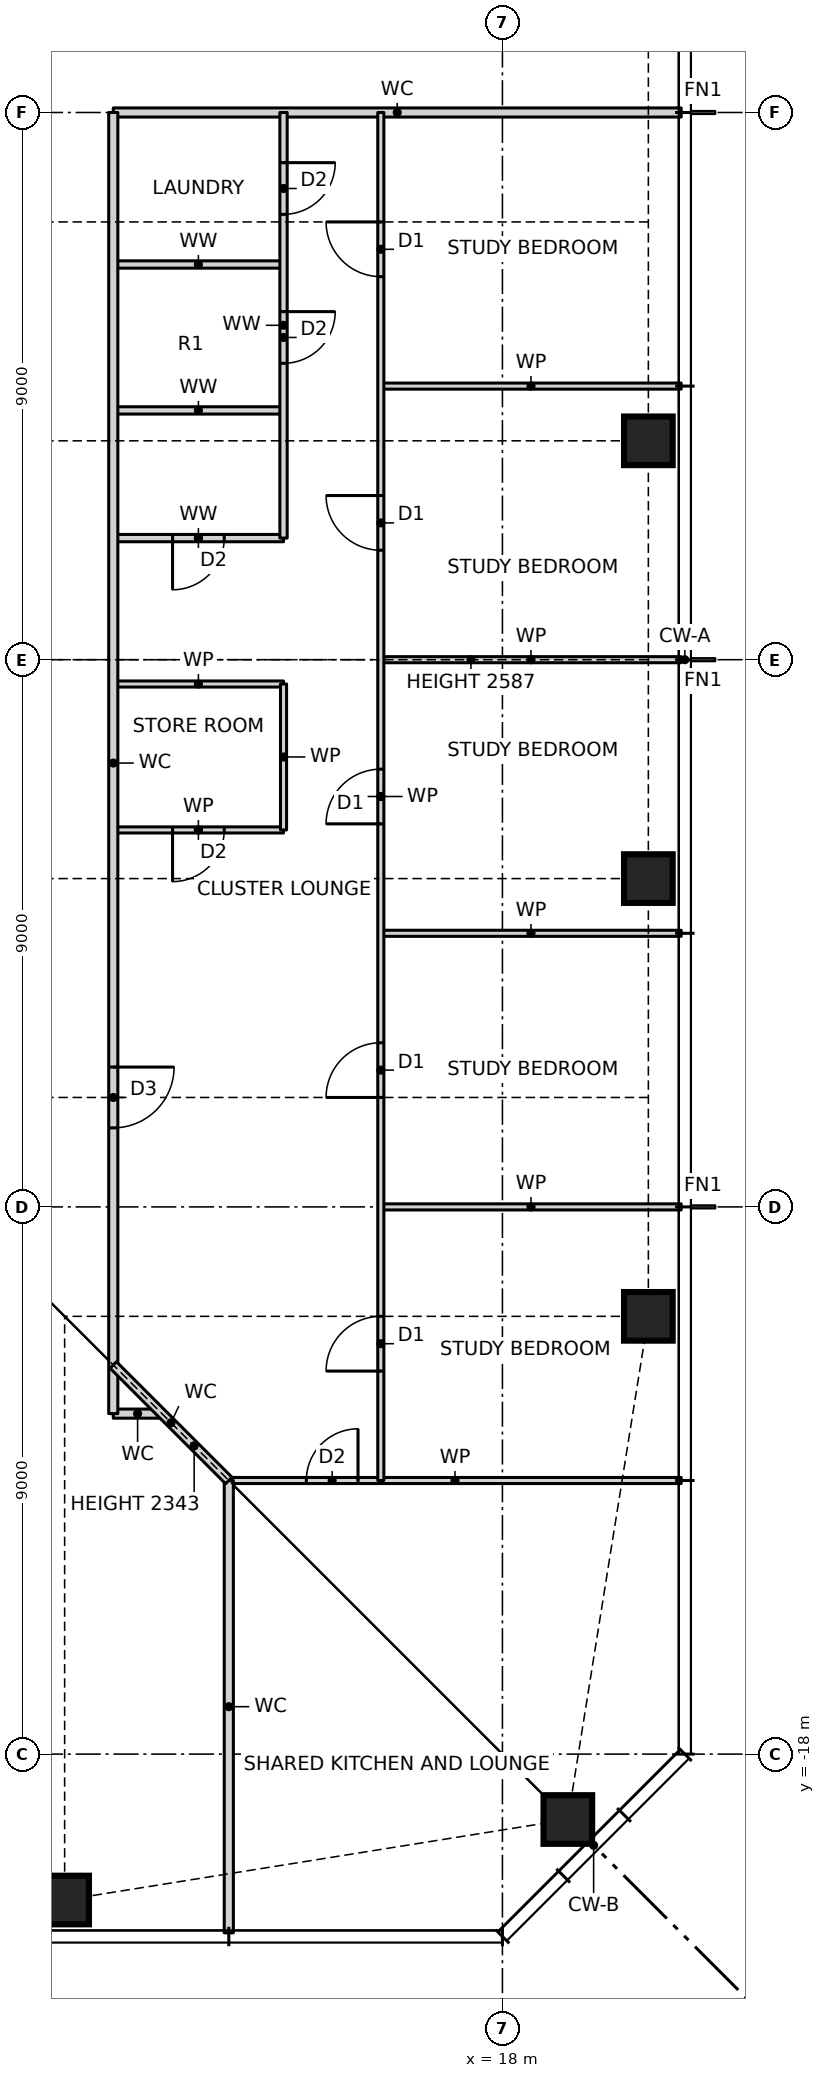
"""IFC4 building model, lengths in metres.
Left out: names, types, materials, properties, quantities, classifications, styles, units other than length and angle.
Written with IfcOpenShell. Run it as: python <this file> out.ifc"""

import sys

from ifc_helpers import new_model, si_unit, direction, frame, frame_2d, origin, origin_2d, place, context, subcontext, project, spatial, rectangle, hollow_rectangle, extrude, element, fill, save


model = new_model("IFC4")
c1 = context("Model", 3, precision=1e-05, world=origin(), true_north=direction((0.0, 1.0)))
c2 = subcontext(c1, "Body", "Model", "MODEL_VIEW")
j1 = project(units=[si_unit("LENGTHUNIT", "METRE"), si_unit("PLANEANGLEUNIT", "RADIAN")], contexts=[c1])
p1 = place(None, origin())
s1 = spatial("IfcSite", under=j1, at=p1, CompositionType="ELEMENT")
p2 = place(p1, origin())
s2 = spatial("IfcBuilding", under=s1, at=p2, CompositionType="ELEMENT")
p3 = place(p2, frame((0.0, 0.0, 87.5)))
s3 = spatial("IfcBuildingStorey", under=s2, at=p3, CompositionType="ELEMENT", Elevation=87.5)
for number, where, z_axis, x_axis in (
    (1, (10.8, -20.4, 0.0), (0.0, 0.0, 1.0), (1.0, 0.0, 0.0)),
    (2, (19.076, -19.076, 0.0), (0.0, 0.0, 1.0), (1.0, 0.0, 0.0)),
    (3, (20.4, -10.8, 0.0), (0.0, 0.0, 1.0), (1.0, 0.0, 0.0)),
    (4, (20.4, -3.6, 0.0), (0.0, 0.0, 1.0), (1.0, 0.0, 0.0)),
    (5, (20.4, 3.6, 0.0), (0.0, 0.0, 1.0), (1.0, 0.0, 0.0)),
):
    element("IfcColumn", number, at=place(p3, frame(where, z_axis=z_axis, x_axis=x_axis)), inside=s3, PredefinedType="COLUMN", context=c2, shape_type="SweptSolid", body=[
        extrude(hollow_rectangle(XDim=0.8, YDim=0.8, WallThickness=0.07, at=origin_2d()), origin(), (0.0, 0.0, 1.0), 3.5),
    ])
p4 = place(p3, frame((13.5, -13.5, 0.0), z_axis=(0.0, 0.0, 1.0), x_axis=(1.0, 0.0, 0.0)))
e6 = element("IfcWall", 6, at=p4, inside=s3, PredefinedType="PARTITIONING", context=c2, shape_type="SweptSolid", body=[
    extrude(rectangle(XDim=7.44, YDim=0.1, at=frame_2d((3.72, 0.0))), origin(), (0.0, 0.0, 1.0), 3.27),
])
p5 = place(p4, frame((1.275, 0.0, 0.0)))
e7 = element("IfcOpeningElement", 7, at=p5, cuts=e6, PredefinedType="OPENING", context=c2, shape_type="SweptSolid", body=[
    extrude(rectangle(XDim=0.85, YDim=2.1, at=frame_2d((0.425, 1.05))), frame((0.0, 0.06, 0.0), z_axis=(0.0, -1.0, 0.0), x_axis=(1.0, 0.0, 0.0)), (0.0, 0.0, 1.0), 0.12),
])
p6 = place(p3, frame((11.6, -12.4, 0.0), z_axis=(0.0, 0.0, 1.0), x_axis=(1.0, 0.0, 0.0)))
e8 = element("IfcWall", 8, at=p6, inside=s3, PredefinedType="PARTITIONING", context=c2, shape_type="SweptSolid", body=[
    extrude(rectangle(XDim=0.8, YDim=0.15, at=frame_2d((0.4, 0.0))), origin(), (0.0, 0.0, 1.0), 3.27),
])
for number, where, z_axis, x_axis in (
    (9, (16.0, -9.0, 0.0), (0.0, 0.0, 1.0), (1.0, 0.0, 0.0)),
    (10, (16.0, -4.5, 0.0), (0.0, 0.0, 1.0), (1.0, 0.0, 0.0)),
):
    element("IfcWall", number, at=place(p3, frame(where, z_axis=z_axis, x_axis=x_axis)), inside=s3, PredefinedType="PARTITIONING", context=c2, shape_type="SweptSolid", body=[
        extrude(rectangle(XDim=4.94, YDim=0.1, at=frame_2d((2.47, 0.0))), origin(), (0.0, 0.0, 1.0), 3.27),
    ])
p7 = place(p3, frame((11.6, -2.8, 0.0), z_axis=(0.0, 0.0, 1.0), x_axis=(1.0, 0.0, 0.0)))
e11 = element("IfcWall", 11, at=p7, inside=s3, PredefinedType="PARTITIONING", context=c2, shape_type="SweptSolid", body=[
    extrude(rectangle(XDim=2.8, YDim=0.1, at=frame_2d((1.4, 0.0))), origin(), (0.0, 0.0, 1.0), 3.27),
])
p8 = place(p7, frame((0.975, 0.0, 0.0)))
e12 = element("IfcOpeningElement", 12, at=p8, cuts=e11, PredefinedType="OPENING", context=c2, shape_type="SweptSolid", body=[
    extrude(rectangle(XDim=0.85, YDim=2.1, at=frame_2d((0.425, 1.05))), frame((0.0, 0.06, 0.0), z_axis=(0.0, -1.0, 0.0), x_axis=(1.0, 0.0, 0.0)), (0.0, 0.0, 1.0), 0.12),
])
p9 = place(p3, frame((11.6, -0.4, 0.0), z_axis=(0.0, 0.0, 1.0), x_axis=(1.0, 0.0, 0.0)))
e13 = element("IfcWall", 13, at=p9, inside=s3, PredefinedType="PARTITIONING", context=c2, shape_type="SweptSolid", body=[
    extrude(rectangle(XDim=2.8, YDim=0.1, at=frame_2d((1.4, 0.0))), origin(), (0.0, 0.0, 1.0), 3.27),
])
p10 = place(p3, frame((16.0, 0.0, 0.0), z_axis=(0.0, 0.0, 1.0), x_axis=(1.0, 0.0, 0.0)))
e14 = element("IfcWall", 14, at=p10, inside=s3, PredefinedType="PARTITIONING", context=c2, shape_type="SweptSolid", body=[
    extrude(rectangle(XDim=4.94, YDim=0.1, at=frame_2d((2.47, 0.0))), origin(), (0.0, 0.0, 1.0), 2.587),
])
p11 = place(p3, frame((11.6, 2.0, 0.0), z_axis=(0.0, 0.0, 1.0), x_axis=(1.0, 0.0, 0.0)))
e15 = element("IfcWall", 15, at=p11, inside=s3, PredefinedType="PARTITIONING", context=c2, shape_type="SweptSolid", body=[
    extrude(rectangle(XDim=2.8, YDim=0.12, at=frame_2d((1.4, 0.0))), origin(), (0.0, 0.0, 1.0), 3.27),
])
p12 = place(p11, frame((0.975, 0.0, 0.0)))
e16 = element("IfcOpeningElement", 16, at=p12, cuts=e15, PredefinedType="OPENING", context=c2, shape_type="SweptSolid", body=[
    extrude(rectangle(XDim=0.85, YDim=2.1, at=frame_2d((0.425, 1.05))), frame((0.0, 0.07, 0.0), z_axis=(0.0, -1.0, 0.0), x_axis=(1.0, 0.0, 0.0)), (0.0, 0.0, 1.0), 0.14),
])
p13 = place(p3, frame((11.6, 4.1, 0.0), z_axis=(0.0, 0.0, 1.0), x_axis=(1.0, 0.0, 0.0)))
e17 = element("IfcWall", 17, at=p13, inside=s3, PredefinedType="PARTITIONING", context=c2, shape_type="SweptSolid", body=[
    extrude(rectangle(XDim=2.8, YDim=0.12, at=frame_2d((1.4, 0.0))), origin(), (0.0, 0.0, 1.0), 3.27),
])
p14 = place(p3, frame((16.0, 4.5, 0.0), z_axis=(0.0, 0.0, 1.0), x_axis=(1.0, 0.0, 0.0)))
e18 = element("IfcWall", 18, at=p14, inside=s3, PredefinedType="PARTITIONING", context=c2, shape_type="SweptSolid", body=[
    extrude(rectangle(XDim=4.94, YDim=0.1, at=frame_2d((2.47, 0.0))), origin(), (0.0, 0.0, 1.0), 3.27),
])
p15 = place(p3, frame((11.6, 6.5, 0.0), z_axis=(0.0, 0.0, 1.0), x_axis=(1.0, 0.0, 0.0)))
e19 = element("IfcWall", 19, at=p15, inside=s3, PredefinedType="PARTITIONING", context=c2, shape_type="SweptSolid", body=[
    extrude(rectangle(XDim=2.8, YDim=0.12, at=frame_2d((1.4, 0.0))), origin(), (0.0, 0.0, 1.0), 3.27),
])
p16 = place(p3, frame((11.6, 9.0, 0.0), z_axis=(0.0, 0.0, 1.0), x_axis=(1.0, 0.0, 0.0)))
e20 = element("IfcWall", 20, at=p16, inside=s3, PredefinedType="PARTITIONING", context=c2, shape_type="SweptSolid", body=[
    extrude(rectangle(XDim=9.34, YDim=0.15, at=frame_2d((4.67, 0.0))), origin(), (0.0, 0.0, 1.0), 3.27),
])
p17 = place(p3, frame((16.0, -13.5, 0.0), z_axis=(0.0, 0.0, 1.0), x_axis=(0.0, 1.0, 0.0)))
e21 = element("IfcWall", 21, at=p17, inside=s3, PredefinedType="PARTITIONING", context=c2, shape_type="SweptSolid", body=[
    extrude(rectangle(XDim=22.5, YDim=0.1, at=frame_2d((11.25, 0.0))), origin(), (0.0, 0.0, 1.0), 3.27),
])
p18 = place(p17, frame((1.8, 0.0, 0.0)))
e22 = element("IfcOpeningElement", 22, at=p18, cuts=e21, PredefinedType="OPENING", context=c2, shape_type="SweptSolid", body=[
    extrude(rectangle(XDim=0.9, YDim=2.1, at=frame_2d((0.45, 1.05))), frame((0.0, 0.06, 0.0), z_axis=(0.0, -1.0, 0.0), x_axis=(1.0, 0.0, 0.0)), (0.0, 0.0, 1.0), 0.12),
])
p19 = place(p17, frame((6.3, 0.0, 0.0)))
e23 = element("IfcOpeningElement", 23, at=p19, cuts=e21, PredefinedType="OPENING", context=c2, shape_type="SweptSolid", body=[
    extrude(rectangle(XDim=0.9, YDim=2.1, at=frame_2d((0.45, 1.05))), frame((0.0, 0.06, 0.0), z_axis=(0.0, -1.0, 0.0), x_axis=(1.0, 0.0, 0.0)), (0.0, 0.0, 1.0), 0.12),
])
p20 = place(p17, frame((10.8, 0.0, 0.0)))
e24 = element("IfcOpeningElement", 24, at=p20, cuts=e21, PredefinedType="OPENING", context=c2, shape_type="SweptSolid", body=[
    extrude(rectangle(XDim=0.9, YDim=2.1, at=frame_2d((0.45, 1.05))), frame((0.0, 0.06, 0.0), z_axis=(0.0, -1.0, 0.0), x_axis=(1.0, 0.0, 0.0)), (0.0, 0.0, 1.0), 0.12),
])
p21 = place(p17, frame((15.3, 0.0, 0.0)))
e25 = element("IfcOpeningElement", 25, at=p21, cuts=e21, PredefinedType="OPENING", context=c2, shape_type="SweptSolid", body=[
    extrude(rectangle(XDim=0.9, YDim=2.1, at=frame_2d((0.45, 1.05))), frame((0.0, 0.06, 0.0), z_axis=(0.0, -1.0, 0.0), x_axis=(1.0, 0.0, 0.0)), (0.0, 0.0, 1.0), 0.12),
])
p22 = place(p17, frame((19.8, 0.0, 0.0)))
e26 = element("IfcOpeningElement", 26, at=p22, cuts=e21, PredefinedType="OPENING", context=c2, shape_type="SweptSolid", body=[
    extrude(rectangle(XDim=0.9, YDim=2.1, at=frame_2d((0.45, 1.05))), frame((0.0, 0.06, 0.0), z_axis=(0.0, -1.0, 0.0), x_axis=(1.0, 0.0, 0.0)), (0.0, 0.0, 1.0), 0.12),
])
p23 = place(p3, frame((14.4, -2.8, 0.0), z_axis=(0.0, 0.0, 1.0), x_axis=(0.0, 1.0, 0.0)))
e27 = element("IfcWall", 27, at=p23, inside=s3, PredefinedType="PARTITIONING", context=c2, shape_type="SweptSolid", body=[
    extrude(rectangle(XDim=2.4, YDim=0.1, at=frame_2d((1.2, 0.0))), origin(), (0.0, 0.0, 1.0), 3.27),
])
p24 = place(p3, frame((14.4, 2.0, 0.0), z_axis=(0.0, 0.0, 1.0), x_axis=(0.0, 1.0, 0.0)))
e28 = element("IfcWall", 28, at=p24, inside=s3, PredefinedType="PARTITIONING", context=c2, shape_type="SweptSolid", body=[
    extrude(rectangle(XDim=7.0, YDim=0.12, at=frame_2d((3.5, 0.0))), origin(), (0.0, 0.0, 1.0), 3.27),
])
p25 = place(p24, frame((2.875, 0.0, 0.0)))
e29 = element("IfcOpeningElement", 29, at=p25, cuts=e28, PredefinedType="OPENING", context=c2, shape_type="SweptSolid", body=[
    extrude(rectangle(XDim=0.85, YDim=2.1, at=frame_2d((0.425, 1.05))), frame((0.0, 0.07, 0.0), z_axis=(0.0, -1.0, 0.0), x_axis=(1.0, 0.0, 0.0)), (0.0, 0.0, 1.0), 0.14),
])
p26 = place(p24, frame((5.325, 0.0, 0.0)))
e30 = element("IfcOpeningElement", 30, at=p26, cuts=e28, PredefinedType="OPENING", context=c2, shape_type="SweptSolid", body=[
    extrude(rectangle(XDim=0.85, YDim=2.1, at=frame_2d((0.425, 1.05))), frame((0.0, 0.07, 0.0), z_axis=(0.0, -1.0, 0.0), x_axis=(1.0, 0.0, 0.0)), (0.0, 0.0, 1.0), 0.14),
])
p27 = place(p3, frame((13.5, -20.94, 0.0), z_axis=(0.0, 0.0, 1.0), x_axis=(0.0, 1.0, 0.0)))
e31 = element("IfcWall", 31, at=p27, inside=s3, PredefinedType="PARTITIONING", context=c2, shape_type="SweptSolid", body=[
    extrude(rectangle(XDim=7.44, YDim=0.15, at=frame_2d((3.72, 0.0))), origin(), (0.0, 0.0, 1.0), 3.27),
])
p28 = place(p3, frame((11.6, -12.4, 0.0), z_axis=(0.0, 0.0, 1.0), x_axis=(0.0, 1.0, 0.0)))
e32 = element("IfcWall", 32, at=p28, inside=s3, PredefinedType="PARTITIONING", context=c2, shape_type="SweptSolid", body=[
    extrude(rectangle(XDim=21.4, YDim=0.15, at=frame_2d((10.7, 0.0))), origin(), (0.0, 0.0, 1.0), 3.27),
])
p29 = place(p28, frame((4.7, 0.0, 0.0)))
e33 = element("IfcOpeningElement", 33, at=p29, cuts=e32, PredefinedType="OPENING", context=c2, shape_type="SweptSolid", body=[
    extrude(rectangle(XDim=1.0, YDim=2.1, at=frame_2d((0.5, 1.05))), frame((0.0, 0.085, 0.0), z_axis=(0.0, -1.0, 0.0), x_axis=(1.0, 0.0, 0.0)), (0.0, 0.0, 1.0), 0.17),
])
p30 = place(p3, frame((13.5, -13.5, 0.0), z_axis=(0.0, 0.0, 1.0), x_axis=(-0.707106781187, 0.707106781187, 0.0)))
e34 = element("IfcWall", 34, at=p30, inside=s3, PredefinedType="PARTITIONING", context=c2, shape_type="SweptSolid", body=[
    extrude(rectangle(XDim=2.687, YDim=0.15, at=frame_2d((1.343, 0.0))), origin(), (0.0, 0.0, 1.0), 2.343),
])
p31 = place(p18, origin())
e35 = element("IfcDoor", 35, at=p31, inside=s3, OperationType="SINGLE_SWING_LEFT", PredefinedType="DOOR", context=c2, shape_type="SweptSolid", body=[
    extrude(rectangle(XDim=0.9, YDim=2.1, at=frame_2d((0.45, 1.05))), frame((0.0, 0.025, 0.0), z_axis=(0.0, -1.0, 0.0), x_axis=(1.0, 0.0, 0.0)), (0.0, 0.0, 1.0), 0.05),
])
fill(e22, e35)
p32 = place(p19, origin())
e36 = element("IfcDoor", 36, at=p32, inside=s3, OperationType="SINGLE_SWING_LEFT", PredefinedType="DOOR", context=c2, shape_type="SweptSolid", body=[
    extrude(rectangle(XDim=0.9, YDim=2.1, at=frame_2d((0.45, 1.05))), frame((0.0, 0.025, 0.0), z_axis=(0.0, -1.0, 0.0), x_axis=(1.0, 0.0, 0.0)), (0.0, 0.0, 1.0), 0.05),
])
fill(e23, e36)
p33 = place(p20, origin())
e37 = element("IfcDoor", 37, at=p33, inside=s3, OperationType="SINGLE_SWING_LEFT", PredefinedType="DOOR", context=c2, shape_type="SweptSolid", body=[
    extrude(rectangle(XDim=0.9, YDim=2.1, at=frame_2d((0.45, 1.05))), frame((0.0, 0.025, 0.0), z_axis=(0.0, -1.0, 0.0), x_axis=(1.0, 0.0, 0.0)), (0.0, 0.0, 1.0), 0.05),
])
fill(e24, e37)
p34 = place(p21, origin())
e38 = element("IfcDoor", 38, at=p34, inside=s3, OperationType="SINGLE_SWING_RIGHT", PredefinedType="DOOR", context=c2, shape_type="SweptSolid", body=[
    extrude(rectangle(XDim=0.9, YDim=2.1, at=frame_2d((0.45, 1.05))), frame((0.0, 0.025, 0.0), z_axis=(0.0, -1.0, 0.0), x_axis=(1.0, 0.0, 0.0)), (0.0, 0.0, 1.0), 0.05),
])
fill(e25, e38)
p35 = place(p22, origin())
e39 = element("IfcDoor", 39, at=p35, inside=s3, OperationType="SINGLE_SWING_RIGHT", PredefinedType="DOOR", context=c2, shape_type="SweptSolid", body=[
    extrude(rectangle(XDim=0.9, YDim=2.1, at=frame_2d((0.45, 1.05))), frame((0.0, 0.025, 0.0), z_axis=(0.0, -1.0, 0.0), x_axis=(1.0, 0.0, 0.0)), (0.0, 0.0, 1.0), 0.05),
])
fill(e26, e39)
p36 = place(p29, frame((1.0, 0.0, 0.0), z_axis=(0.0, 0.0, 1.0), x_axis=(-1.0, 0.0, 0.0)))
e40 = element("IfcDoor", 40, at=p36, inside=s3, OperationType="SINGLE_SWING_LEFT", PredefinedType="DOOR", context=c2, shape_type="SweptSolid", body=[
    extrude(rectangle(XDim=1.0, YDim=2.1, at=frame_2d((0.5, 1.05))), frame((0.0, 0.025, 0.0), z_axis=(0.0, -1.0, 0.0), x_axis=(1.0, 0.0, 0.0)), (0.0, 0.0, 1.0), 0.05),
])
fill(e33, e40)
p37 = place(p8, frame((0.85, 0.0, 0.0), z_axis=(0.0, 0.0, 1.0), x_axis=(-1.0, 0.0, 0.0)))
e41 = element("IfcDoor", 41, at=p37, inside=s3, OperationType="SINGLE_SWING_RIGHT", PredefinedType="DOOR", context=c2, shape_type="SweptSolid", body=[
    extrude(rectangle(XDim=0.85, YDim=2.1, at=frame_2d((0.425, 1.05))), frame((0.0, 0.025, 0.0), z_axis=(0.0, -1.0, 0.0), x_axis=(1.0, 0.0, 0.0)), (0.0, 0.0, 1.0), 0.05),
])
fill(e12, e41)
p38 = place(p12, frame((0.85, 0.0, 0.0), z_axis=(0.0, 0.0, 1.0), x_axis=(-1.0, 0.0, 0.0)))
e42 = element("IfcDoor", 42, at=p38, inside=s3, OperationType="SINGLE_SWING_RIGHT", PredefinedType="DOOR", context=c2, shape_type="SweptSolid", body=[
    extrude(rectangle(XDim=0.85, YDim=2.1, at=frame_2d((0.425, 1.05))), frame((0.0, 0.025, 0.0), z_axis=(0.0, -1.0, 0.0), x_axis=(1.0, 0.0, 0.0)), (0.0, 0.0, 1.0), 0.05),
])
fill(e16, e42)
p39 = place(p25, frame((0.85, 0.0, 0.0), z_axis=(0.0, 0.0, 1.0), x_axis=(-1.0, 0.0, 0.0)))
e43 = element("IfcDoor", 43, at=p39, inside=s3, OperationType="SINGLE_SWING_LEFT", PredefinedType="DOOR", context=c2, shape_type="SweptSolid", body=[
    extrude(rectangle(XDim=0.85, YDim=2.1, at=frame_2d((0.425, 1.05))), frame((0.0, 0.025, 0.0), z_axis=(0.0, -1.0, 0.0), x_axis=(1.0, 0.0, 0.0)), (0.0, 0.0, 1.0), 0.05),
])
fill(e29, e43)
p40 = place(p26, frame((0.85, 0.0, 0.0), z_axis=(0.0, 0.0, 1.0), x_axis=(-1.0, 0.0, 0.0)))
e44 = element("IfcDoor", 44, at=p40, inside=s3, OperationType="SINGLE_SWING_LEFT", PredefinedType="DOOR", context=c2, shape_type="SweptSolid", body=[
    extrude(rectangle(XDim=0.85, YDim=2.1, at=frame_2d((0.425, 1.05))), frame((0.0, 0.025, 0.0), z_axis=(0.0, -1.0, 0.0), x_axis=(1.0, 0.0, 0.0)), (0.0, 0.0, 1.0), 0.05),
])
fill(e30, e44)
p41 = place(p5, origin())
e45 = element("IfcDoor", 45, at=p41, inside=s3, OperationType="SINGLE_SWING_RIGHT", PredefinedType="DOOR", context=c2, shape_type="SweptSolid", body=[
    extrude(rectangle(XDim=0.85, YDim=2.1, at=frame_2d((0.425, 1.05))), frame((0.0, 0.025, 0.0), z_axis=(0.0, -1.0, 0.0), x_axis=(1.0, 0.0, 0.0)), (0.0, 0.0, 1.0), 0.05),
])
fill(e7, e45)
save(model, sys.argv[1])
